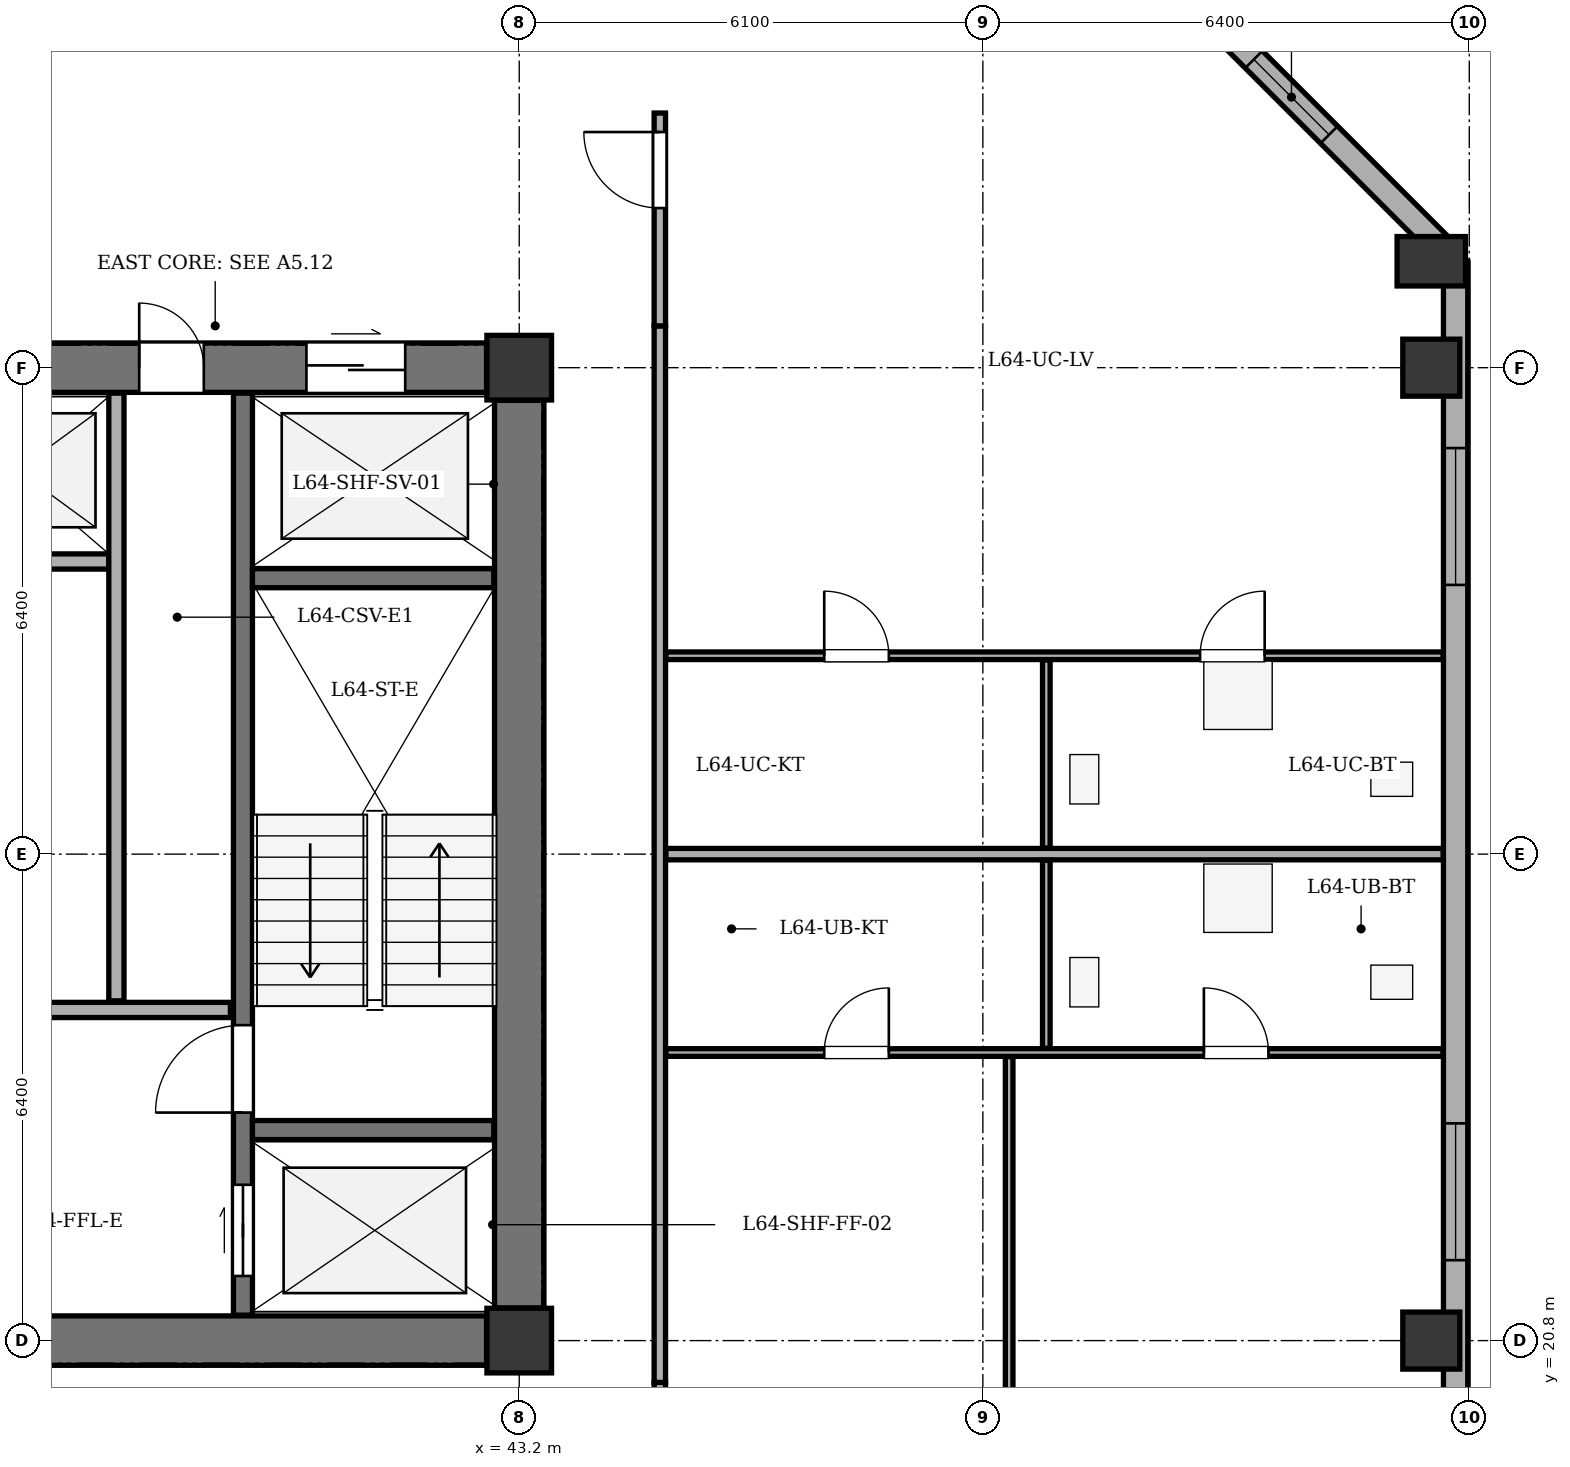
"""IFC4 building model, lengths in metres.
Left out: names, types, materials, properties, quantities, classifications, styles, units other than length and angle.
Written with IfcOpenShell. Run it as: python <this file> out.ifc"""

import sys

from ifc_helpers import new_model, si_unit, direction, frame, frame_2d, origin, origin_2d, place, context, subcontext, project, spatial, rectangle, extrude, element, fill, save


model = new_model("IFC4")
c1 = context("Model", 3, precision=1e-05, world=origin(), true_north=direction((0.0, 1.0)))
c2 = subcontext(c1, "Body", "Model", "MODEL_VIEW")
j1 = project(units=[si_unit("LENGTHUNIT", "METRE"), si_unit("PLANEANGLEUNIT", "RADIAN")], contexts=[c1])
p1 = place(None, origin())
s1 = spatial("IfcSite", under=j1, at=p1, CompositionType="ELEMENT")
p2 = place(p1, origin())
s2 = spatial("IfcBuilding", under=s1, at=p2, CompositionType="ELEMENT")
p3 = place(p2, frame((0.0, 0.0, 244.9)))
s3 = spatial("IfcBuildingStorey", under=s2, at=p3, CompositionType="ELEMENT", Elevation=244.9)
for number, where, z_axis, x_axis in (
    (1, (43.2, 20.8, 0.0), (0.0, 0.0, 1.0), (1.0, 0.0, 0.0)),
    (2, (43.2, 33.6, 0.0), (0.0, 0.0, 1.0), (1.0, 0.0, 0.0)),
):
    element("IfcColumn", number, at=place(p3, frame(where, z_axis=z_axis, x_axis=x_axis)), inside=s3, PredefinedType="COLUMN", context=c2, shape_type="SweptSolid", body=[
        extrude(rectangle(XDim=0.85, YDim=0.85, at=origin_2d()), origin(), (0.0, 0.0, 1.0), 3.4),
    ])
for number, where, z_axis, x_axis in (
    (3, (55.2, 20.8, 0.0), (0.0, 0.0, 1.0), (1.0, 0.0, 0.0)),
    (4, (55.2, 33.6, 0.0), (0.0, 0.0, 1.0), (1.0, 0.0, 0.0)),
):
    element("IfcColumn", number, at=place(p3, frame(where, z_axis=z_axis, x_axis=x_axis)), inside=s3, PredefinedType="COLUMN", context=c2, shape_type="SweptSolid", body=[
        extrude(rectangle(XDim=0.75, YDim=0.75, at=origin_2d()), origin(), (0.0, 0.0, 1.0), 3.4),
    ])
p4 = place(p3, frame((55.2, 35.0, 0.0), z_axis=(0.0, 0.0, 1.0), x_axis=(1.0, 0.0, 0.0)))
e5 = element("IfcColumn", 5, at=p4, inside=s3, PredefinedType="COLUMN", context=c2, shape_type="SweptSolid", body=[
    extrude(rectangle(XDim=0.65, YDim=0.9, at=origin_2d()), origin(), (0.0, 0.0, 1.0), 3.4),
])
p5 = place(p3, frame((51.2, 39.32, 0.0), z_axis=(0.0, 0.0, 1.0), x_axis=(0.707106781187, -0.707106781187, 0.0)))
e6 = element("IfcWall", 6, at=p5, inside=s3, PredefinedType="STANDARD", context=c2, shape_type="SweptSolid", body=[
    extrude(rectangle(XDim=6.11, YDim=0.32, at=frame_2d((3.055, 0.0))), origin(), (0.0, 0.0, 1.0), 2.335),
])
p6 = place(p5, frame((2.355, 0.0, 0.75)))
e7 = element("IfcOpeningElement", 7, at=p6, cuts=e6, PredefinedType="OPENING", context=c2, shape_type="SweptSolid", body=[
    extrude(rectangle(XDim=1.4, YDim=1.465, at=frame_2d((0.7, 0.732))), frame((0.0, 0.17, 0.0), z_axis=(0.0, -1.0, 0.0), x_axis=(1.0, 0.0, 0.0)), (0.0, 0.0, 1.0), 0.34),
])
p7 = place(p3, frame((55.52, 35.0, 0.0), z_axis=(0.0, 0.0, 1.0), x_axis=(0.0, -1.0, 0.0)))
e8 = element("IfcWall", 8, at=p7, inside=s3, PredefinedType="STANDARD", context=c2, shape_type="SweptSolid", body=[
    extrude(rectangle(XDim=27.8, YDim=0.32, at=frame_2d((13.9, 0.0))), origin(), (0.0, 0.0, 1.0), 2.335),
])
p8 = place(p7, frame((2.458, 0.0, 0.75)))
e9 = element("IfcOpeningElement", 9, at=p8, cuts=e8, PredefinedType="OPENING", context=c2, shape_type="SweptSolid", body=[
    extrude(rectangle(XDim=1.8, YDim=1.465, at=frame_2d((0.9, 0.732))), frame((0.0, 0.17, 0.0), z_axis=(0.0, -1.0, 0.0), x_axis=(1.0, 0.0, 0.0)), (0.0, 0.0, 1.0), 0.34),
])
p9 = place(p7, frame((11.342, 0.0, 0.75)))
e10 = element("IfcOpeningElement", 10, at=p9, cuts=e8, PredefinedType="OPENING", context=c2, shape_type="SweptSolid", body=[
    extrude(rectangle(XDim=1.8, YDim=1.465, at=frame_2d((0.9, 0.732))), frame((0.0, 0.17, 0.0), z_axis=(0.0, -1.0, 0.0), x_axis=(1.0, 0.0, 0.0)), (0.0, 0.0, 1.0), 0.34),
])
p10 = place(p7, frame((17.117, 0.0, 0.75)))
e11 = element("IfcOpeningElement", 11, at=p10, cuts=e8, PredefinedType="OPENING", context=c2, shape_type="SweptSolid", body=[
    extrude(rectangle(XDim=1.8, YDim=1.465, at=frame_2d((0.9, 0.732))), frame((0.0, 0.17, 0.0), z_axis=(0.0, -1.0, 0.0), x_axis=(1.0, 0.0, 0.0)), (0.0, 0.0, 1.0), 0.34),
])
p11 = place(p7, frame((22.808, 0.0, 0.75)))
e12 = element("IfcOpeningElement", 12, at=p11, cuts=e8, PredefinedType="OPENING", context=c2, shape_type="SweptSolid", body=[
    extrude(rectangle(XDim=2.2, YDim=1.465, at=frame_2d((1.1, 0.732))), frame((0.0, 0.17, 0.0), z_axis=(0.0, -1.0, 0.0), x_axis=(1.0, 0.0, 0.0)), (0.0, 0.0, 1.0), 0.34),
])
p12 = place(p3, frame((43.2, 21.23, 0.0), z_axis=(0.0, 0.0, 1.0), x_axis=(0.0, 1.0, 0.0)))
e13 = element("IfcWall", 13, at=p12, inside=s3, PredefinedType="SHEAR", context=c2, shape_type="SweptSolid", body=[
    extrude(rectangle(XDim=11.94, YDim=0.65, at=frame_2d((5.97, 0.0))), origin(), (0.0, 0.0, 1.0), 2.95),
])
p13 = place(p3, frame((35.63, 20.8, 0.0), z_axis=(0.0, 0.0, 1.0), x_axis=(1.0, 0.0, 0.0)))
e14 = element("IfcWall", 14, at=p13, inside=s3, PredefinedType="SHEAR", context=c2, shape_type="SweptSolid", body=[
    extrude(rectangle(XDim=7.14, YDim=0.65, at=frame_2d((3.57, 0.0))), origin(), (0.0, 0.0, 1.0), 2.95),
])
p14 = place(p3, frame((35.63, 33.6, 0.0), z_axis=(0.0, 0.0, 1.0), x_axis=(1.0, 0.0, 0.0)))
e15 = element("IfcWall", 15, at=p14, inside=s3, PredefinedType="SHEAR", context=c2, shape_type="SweptSolid", body=[
    extrude(rectangle(XDim=7.14, YDim=0.65, at=frame_2d((3.57, 0.0))), origin(), (0.0, 0.0, 1.0), 2.95),
])
p15 = place(p14, frame((4.77, 0.0, 0.0)))
e16 = element("IfcOpeningElement", 16, at=p15, cuts=e15, PredefinedType="OPENING", context=c2, shape_type="SweptSolid", body=[
    extrude(rectangle(XDim=1.3, YDim=2.15, at=frame_2d((0.65, 1.075))), frame((0.0, 0.335, 0.0), z_axis=(0.0, -1.0, 0.0), x_axis=(1.0, 0.0, 0.0)), (0.0, 0.0, 1.0), 0.67),
])
p16 = place(p14, frame((2.57, 0.0, 0.0)))
e17 = element("IfcOpeningElement", 17, at=p16, cuts=e15, PredefinedType="OPENING", context=c2, shape_type="SweptSolid", body=[
    extrude(rectangle(XDim=0.85, YDim=2.02, at=frame_2d((0.425, 1.01))), frame((0.0, 0.335, 0.0), z_axis=(0.0, -1.0, 0.0), x_axis=(1.0, 0.0, 0.0)), (0.0, 0.0, 1.0), 0.67),
])
p17 = place(p3, frame((39.565, 21.135, 0.0), z_axis=(0.0, 0.0, 1.0), x_axis=(0.0, 1.0, 0.0)))
e18 = element("IfcWall", 18, at=p17, inside=s3, PredefinedType="SHEAR", context=c2, shape_type="SweptSolid", body=[
    extrude(rectangle(XDim=12.13, YDim=0.25, at=frame_2d((6.065, 0.0))), origin(), (0.0, 0.0, 1.0), 2.95),
])
p18 = place(p17, frame((0.515, 0.0, 0.0)))
e19 = element("IfcOpeningElement", 19, at=p18, cuts=e18, PredefinedType="OPENING", context=c2, shape_type="SweptSolid", body=[
    extrude(rectangle(XDim=1.2, YDim=2.15, at=frame_2d((0.6, 1.075))), frame((0.0, 0.135, 0.0), z_axis=(0.0, -1.0, 0.0), x_axis=(1.0, 0.0, 0.0)), (0.0, 0.0, 1.0), 0.27),
])
p19 = place(p17, frame((2.665, 0.0, 0.0)))
e20 = element("IfcOpeningElement", 20, at=p19, cuts=e18, PredefinedType="OPENING", context=c2, shape_type="SweptSolid", body=[
    extrude(rectangle(XDim=1.15, YDim=2.15, at=frame_2d((0.575, 1.075))), frame((0.0, 0.135, 0.0), z_axis=(0.0, -1.0, 0.0), x_axis=(1.0, 0.0, 0.0)), (0.0, 0.0, 1.0), 0.27),
])
for number, where, z_axis, x_axis in (
    (21, (39.69, 23.57, 0.0), (0.0, 0.0, 1.0), (1.0, 0.0, 0.0)),
    (22, (39.69, 30.83, 0.0), (0.0, 0.0, 1.0), (1.0, 0.0, 0.0)),
):
    element("IfcWall", number, at=place(p3, frame(where, z_axis=z_axis, x_axis=x_axis)), inside=s3, PredefinedType="SHEAR", context=c2, shape_type="SweptSolid", body=[
        extrude(rectangle(XDim=3.175, YDim=0.25, at=frame_2d((1.587, 0.0))), origin(), (0.0, 0.0, 1.0), 2.95),
    ])
p20 = place(p3, frame((35.55, 25.15, 0.0), z_axis=(0.0, 0.0, 1.0), x_axis=(1.0, 0.0, 0.0)))
e23 = element("IfcWall", 23, at=p20, inside=s3, PredefinedType="SOLIDWALL", context=c2, shape_type="SweptSolid", body=[
    extrude(rectangle(XDim=3.85, YDim=0.2, at=frame_2d((1.925, 0.0))), origin(), (0.0, 0.0, 1.0), 2.95),
])
p21 = place(p3, frame((35.55, 31.05, 0.0), z_axis=(0.0, 0.0, 1.0), x_axis=(1.0, 0.0, 0.0)))
e24 = element("IfcWall", 24, at=p21, inside=s3, PredefinedType="SOLIDWALL", context=c2, shape_type="SweptSolid", body=[
    extrude(rectangle(XDim=2.25, YDim=0.2, at=frame_2d((1.125, 0.0))), origin(), (0.0, 0.0, 1.0), 2.95),
])
p22 = place(p3, frame((37.9, 25.27, 0.0), z_axis=(0.0, 0.0, 1.0), x_axis=(0.0, 1.0, 0.0)))
e25 = element("IfcWall", 25, at=p22, inside=s3, PredefinedType="SOLIDWALL", context=c2, shape_type="SweptSolid", body=[
    extrude(rectangle(XDim=7.995, YDim=0.2, at=frame_2d((3.998, 0.0))), origin(), (0.0, 0.0, 1.0), 2.95),
])
p23 = place(p3, frame((45.05, 18.46, 0.0), z_axis=(0.0, 0.0, 1.0), x_axis=(0.0, 1.0, 0.0)))
e26 = element("IfcWall", 26, at=p23, inside=s3, PredefinedType="PARTITIONING", context=c2, shape_type="SweptSolid", body=[
    extrude(rectangle(XDim=1.79, YDim=0.15, at=frame_2d((0.895, 0.0))), origin(), (0.0, 0.0, 1.0), 2.385),
])
p24 = place(p23, frame((0.375, 0.0, 0.0)))
e27 = element("IfcOpeningElement", 27, at=p24, cuts=e26, PredefinedType="OPENING", context=c2, shape_type="SweptSolid", body=[
    extrude(rectangle(XDim=1.0, YDim=2.1, at=frame_2d((0.5, 1.05))), frame((0.0, 0.085, 0.0), z_axis=(0.0, -1.0, 0.0), x_axis=(1.0, 0.0, 0.0)), (0.0, 0.0, 1.0), 0.17),
])
p25 = place(p3, frame((45.05, 20.25, 0.0), z_axis=(0.0, 0.0, 1.0), x_axis=(0.0, 1.0, 0.0)))
e28 = element("IfcWall", 28, at=p25, inside=s3, PredefinedType="PARTITIONING", context=c2, shape_type="SweptSolid", body=[
    extrude(rectangle(XDim=13.9, YDim=0.15, at=frame_2d((6.95, 0.0))), origin(), (0.0, 0.0, 1.0), 2.385),
])
p26 = place(p3, frame((45.05, 34.15, 0.0), z_axis=(0.0, 0.0, 1.0), x_axis=(0.0, 1.0, 0.0)))
e29 = element("IfcWall", 29, at=p26, inside=s3, PredefinedType="PARTITIONING", context=c2, shape_type="SweptSolid", body=[
    extrude(rectangle(XDim=2.8, YDim=0.15, at=frame_2d((1.4, 0.0))), origin(), (0.0, 0.0, 1.0), 2.385),
])
p27 = place(p26, frame((1.55, 0.0, 0.0)))
e30 = element("IfcOpeningElement", 30, at=p27, cuts=e29, PredefinedType="OPENING", context=c2, shape_type="SweptSolid", body=[
    extrude(rectangle(XDim=1.0, YDim=2.1, at=frame_2d((0.5, 1.05))), frame((0.0, 0.085, 0.0), z_axis=(0.0, -1.0, 0.0), x_axis=(1.0, 0.0, 0.0)), (0.0, 0.0, 1.0), 0.17),
])
p28 = place(p3, frame((45.13, 27.2, 0.0), z_axis=(0.0, 0.0, 1.0), x_axis=(1.0, 0.0, 0.0)))
e31 = element("IfcWall", 31, at=p28, inside=s3, PredefinedType="PARTITIONING", context=c2, shape_type="SweptSolid", body=[
    extrude(rectangle(XDim=10.225, YDim=0.15, at=frame_2d((5.113, 0.0))), origin(), (0.0, 0.0, 1.0), 2.385),
])
p29 = place(p3, frame((45.13, 24.59, 0.0), z_axis=(0.0, 0.0, 1.0), x_axis=(1.0, 0.0, 0.0)))
e32 = element("IfcWall", 32, at=p29, inside=s3, PredefinedType="PARTITIONING", context=c2, shape_type="SweptSolid", body=[
    extrude(rectangle(XDim=10.225, YDim=0.1, at=frame_2d((5.113, 0.0))), origin(), (0.0, 0.0, 1.0), 2.95),
])
p30 = place(p29, frame((2.083, 0.0, 0.0)))
e33 = element("IfcOpeningElement", 33, at=p30, cuts=e32, PredefinedType="OPENING", context=c2, shape_type="SweptSolid", body=[
    extrude(rectangle(XDim=0.85, YDim=2.05, at=frame_2d((0.425, 1.025))), frame((0.0, 0.06, 0.0), z_axis=(0.0, -1.0, 0.0), x_axis=(1.0, 0.0, 0.0)), (0.0, 0.0, 1.0), 0.12),
])
p31 = place(p29, frame((7.078, 0.0, 0.0)))
e34 = element("IfcOpeningElement", 34, at=p31, cuts=e32, PredefinedType="OPENING", context=c2, shape_type="SweptSolid", body=[
    extrude(rectangle(XDim=0.85, YDim=2.05, at=frame_2d((0.425, 1.025))), frame((0.0, 0.06, 0.0), z_axis=(0.0, -1.0, 0.0), x_axis=(1.0, 0.0, 0.0)), (0.0, 0.0, 1.0), 0.12),
])
p32 = place(p3, frame((49.646, 7.08, 0.0), z_axis=(0.0, 0.0, 1.0), x_axis=(0.0, 1.0, 0.0)))
e35 = element("IfcWall", 35, at=p32, inside=s3, PredefinedType="PARTITIONING", context=c2, shape_type="SweptSolid", body=[
    extrude(rectangle(XDim=17.455, YDim=0.1, at=frame_2d((8.728, 0.0))), origin(), (0.0, 0.0, 1.0), 2.95),
])
p33 = place(p32, frame((0.7, 0.0, 0.0)))
e36 = element("IfcOpeningElement", 36, at=p33, cuts=e35, PredefinedType="OPENING", context=c2, shape_type="SweptSolid", body=[
    extrude(rectangle(XDim=0.9, YDim=2.05, at=frame_2d((0.45, 1.025))), frame((0.0, 0.06, 0.0), z_axis=(0.0, -1.0, 0.0), x_axis=(1.0, 0.0, 0.0)), (0.0, 0.0, 1.0), 0.12),
])
p34 = place(p3, frame((50.135, 24.645, 0.0), z_axis=(0.0, 0.0, 1.0), x_axis=(0.0, 1.0, 0.0)))
e37 = element("IfcWall", 37, at=p34, inside=s3, PredefinedType="PARTITIONING", context=c2, shape_type="SweptSolid", body=[
    extrude(rectangle(XDim=2.475, YDim=0.1, at=frame_2d((1.238, 0.0))), origin(), (0.0, 0.0, 1.0), 2.95),
])
p35 = place(p3, frame((45.13, 29.81, 0.0), z_axis=(0.0, 0.0, 1.0), x_axis=(1.0, 0.0, 0.0)))
e38 = element("IfcWall", 38, at=p35, inside=s3, PredefinedType="PARTITIONING", context=c2, shape_type="SweptSolid", body=[
    extrude(rectangle(XDim=10.225, YDim=0.1, at=frame_2d((5.113, 0.0))), origin(), (0.0, 0.0, 1.0), 2.95),
])
p36 = place(p35, frame((2.083, 0.0, 0.0)))
e39 = element("IfcOpeningElement", 39, at=p36, cuts=e38, PredefinedType="OPENING", context=c2, shape_type="SweptSolid", body=[
    extrude(rectangle(XDim=0.85, YDim=2.05, at=frame_2d((0.425, 1.025))), frame((0.0, 0.06, 0.0), z_axis=(0.0, -1.0, 0.0), x_axis=(1.0, 0.0, 0.0)), (0.0, 0.0, 1.0), 0.12),
])
p37 = place(p35, frame((7.028, 0.0, 0.0)))
e40 = element("IfcOpeningElement", 40, at=p37, cuts=e38, PredefinedType="OPENING", context=c2, shape_type="SweptSolid", body=[
    extrude(rectangle(XDim=0.85, YDim=2.05, at=frame_2d((0.425, 1.025))), frame((0.0, 0.06, 0.0), z_axis=(0.0, -1.0, 0.0), x_axis=(1.0, 0.0, 0.0)), (0.0, 0.0, 1.0), 0.12),
])
p38 = place(p3, frame((50.135, 27.28, 0.0), z_axis=(0.0, 0.0, 1.0), x_axis=(0.0, 1.0, 0.0)))
e41 = element("IfcWall", 41, at=p38, inside=s3, PredefinedType="PARTITIONING", context=c2, shape_type="SweptSolid", body=[
    extrude(rectangle(XDim=2.475, YDim=0.1, at=frame_2d((1.237, 0.0))), origin(), (0.0, 0.0, 1.0), 2.95),
])
p39 = place(p8, origin())
e42 = element("IfcWindow", 42, at=p39, inside=s3, PartitioningType="SINGLE_PANEL", PredefinedType="WINDOW", context=c2, shape_type="SweptSolid", body=[
    extrude(rectangle(XDim=1.8, YDim=1.465, at=frame_2d((0.9, 0.732))), frame((0.0, -0.01, 0.0), z_axis=(0.0, -1.0, 0.0), x_axis=(1.0, 0.0, 0.0)), (0.0, 0.0, 1.0), 0.06),
])
fill(e9, e42)
p40 = place(p9, origin())
e43 = element("IfcWindow", 43, at=p40, inside=s3, PartitioningType="SINGLE_PANEL", PredefinedType="WINDOW", context=c2, shape_type="SweptSolid", body=[
    extrude(rectangle(XDim=1.8, YDim=1.465, at=frame_2d((0.9, 0.732))), frame((0.0, -0.01, 0.0), z_axis=(0.0, -1.0, 0.0), x_axis=(1.0, 0.0, 0.0)), (0.0, 0.0, 1.0), 0.06),
])
fill(e10, e43)
p41 = place(p6, origin())
e44 = element("IfcWindow", 44, at=p41, inside=s3, PartitioningType="SINGLE_PANEL", PredefinedType="WINDOW", context=c2, shape_type="SweptSolid", body=[
    extrude(rectangle(XDim=1.4, YDim=1.465, at=frame_2d((0.7, 0.732))), frame((0.0, -0.01, 0.0), z_axis=(0.0, -1.0, 0.0), x_axis=(1.0, 0.0, 0.0)), (0.0, 0.0, 1.0), 0.06),
])
fill(e7, e44)
p42 = place(p15, origin())
e45 = element("IfcDoor", 45, at=p42, inside=s3, OperationType="DOUBLE_DOOR_SLIDING", PredefinedType="DOOR", context=c2, shape_type="SweptSolid", body=[
    extrude(rectangle(XDim=1.3, YDim=2.15, at=frame_2d((0.65, 1.075))), frame((0.0, 0.025, 0.0), z_axis=(0.0, -1.0, 0.0), x_axis=(1.0, 0.0, 0.0)), (0.0, 0.0, 1.0), 0.05),
])
fill(e16, e45)
p43 = place(p16, origin())
e46 = element("IfcDoor", 46, at=p43, inside=s3, OperationType="SINGLE_SWING_LEFT", PredefinedType="DOOR", context=c2, shape_type="SweptSolid", body=[
    extrude(rectangle(XDim=0.85, YDim=2.02, at=frame_2d((0.425, 1.01))), frame((0.0, 0.025, 0.0), z_axis=(0.0, -1.0, 0.0), x_axis=(1.0, 0.0, 0.0)), (0.0, 0.0, 1.0), 0.05),
])
fill(e17, e46)
p44 = place(p18, origin())
e47 = element("IfcDoor", 47, at=p44, inside=s3, OperationType="DOUBLE_DOOR_SLIDING", PredefinedType="DOOR", context=c2, shape_type="SweptSolid", body=[
    extrude(rectangle(XDim=1.2, YDim=2.15, at=frame_2d((0.6, 1.075))), frame((0.0, 0.025, 0.0), z_axis=(0.0, -1.0, 0.0), x_axis=(1.0, 0.0, 0.0)), (0.0, 0.0, 1.0), 0.05),
])
fill(e19, e47)
p45 = place(p19, origin())
e48 = element("IfcDoor", 48, at=p45, inside=s3, OperationType="SINGLE_SWING_LEFT", PredefinedType="DOOR", context=c2, shape_type="SweptSolid", body=[
    extrude(rectangle(XDim=1.15, YDim=2.15, at=frame_2d((0.575, 1.075))), frame((0.0, 0.025, 0.0), z_axis=(0.0, -1.0, 0.0), x_axis=(1.0, 0.0, 0.0)), (0.0, 0.0, 1.0), 0.05),
])
fill(e20, e48)
p46 = place(p30, origin())
e49 = element("IfcDoor", 49, at=p46, inside=s3, OperationType="SINGLE_SWING_RIGHT", PredefinedType="DOOR", context=c2, shape_type="SweptSolid", body=[
    extrude(rectangle(XDim=0.85, YDim=2.05, at=frame_2d((0.425, 1.025))), frame((0.0, 0.025, 0.0), z_axis=(0.0, -1.0, 0.0), x_axis=(1.0, 0.0, 0.0)), (0.0, 0.0, 1.0), 0.05),
])
fill(e33, e49)
p47 = place(p31, origin())
e50 = element("IfcDoor", 50, at=p47, inside=s3, OperationType="SINGLE_SWING_LEFT", PredefinedType="DOOR", context=c2, shape_type="SweptSolid", body=[
    extrude(rectangle(XDim=0.85, YDim=2.05, at=frame_2d((0.425, 1.025))), frame((0.0, 0.025, 0.0), z_axis=(0.0, -1.0, 0.0), x_axis=(1.0, 0.0, 0.0)), (0.0, 0.0, 1.0), 0.05),
])
fill(e34, e50)
p48 = place(p27, origin())
e51 = element("IfcDoor", 51, at=p48, inside=s3, OperationType="SINGLE_SWING_RIGHT", PredefinedType="DOOR", context=c2, shape_type="SweptSolid", body=[
    extrude(rectangle(XDim=1.0, YDim=2.1, at=frame_2d((0.5, 1.05))), frame((0.0, 0.025, 0.0), z_axis=(0.0, -1.0, 0.0), x_axis=(1.0, 0.0, 0.0)), (0.0, 0.0, 1.0), 0.05),
])
fill(e30, e51)
p49 = place(p36, origin())
e52 = element("IfcDoor", 52, at=p49, inside=s3, OperationType="SINGLE_SWING_LEFT", PredefinedType="DOOR", context=c2, shape_type="SweptSolid", body=[
    extrude(rectangle(XDim=0.85, YDim=2.05, at=frame_2d((0.425, 1.025))), frame((0.0, 0.025, 0.0), z_axis=(0.0, -1.0, 0.0), x_axis=(1.0, 0.0, 0.0)), (0.0, 0.0, 1.0), 0.05),
])
fill(e39, e52)
p50 = place(p37, origin())
e53 = element("IfcDoor", 53, at=p50, inside=s3, OperationType="SINGLE_SWING_RIGHT", PredefinedType="DOOR", context=c2, shape_type="SweptSolid", body=[
    extrude(rectangle(XDim=0.85, YDim=2.05, at=frame_2d((0.425, 1.025))), frame((0.0, 0.025, 0.0), z_axis=(0.0, -1.0, 0.0), x_axis=(1.0, 0.0, 0.0)), (0.0, 0.0, 1.0), 0.05),
])
fill(e40, e53)
save(model, sys.argv[1])
